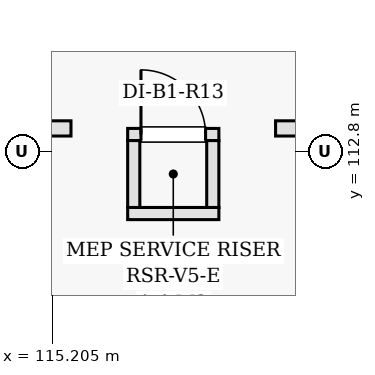
"""IFC4 building model, lengths in metres.
Left out: names, types, materials, properties, quantities, classifications, styles, units other than length and angle.
Written with IfcOpenShell. Run it as: python <this file> out.ifc"""

import sys

from ifc_helpers import new_model, si_unit, direction, frame, frame_2d, origin, place, context, subcontext, project, spatial, rectangle, extrude, element, fill, save


model = new_model("IFC4")
c1 = context("Model", 3, precision=1e-05, world=origin(), true_north=direction((0.0, 1.0)))
c2 = subcontext(c1, "Body", "Model", "MODEL_VIEW")
j1 = project(units=[si_unit("LENGTHUNIT", "METRE"), si_unit("PLANEANGLEUNIT", "RADIAN")], contexts=[c1])
p1 = place(None, origin())
s1 = spatial("IfcSite", under=j1, at=p1, CompositionType="ELEMENT")
p2 = place(p1, origin())
s2 = spatial("IfcBuilding", under=s1, at=p2, CompositionType="ELEMENT")
p3 = place(p2, frame((0.0, 0.0, -4.5)))
s3 = spatial("IfcBuildingStorey", under=s2, at=p3, CompositionType="ELEMENT", Elevation=-4.5)
p4 = place(p3, frame((116.2, 111.98, 0.0), z_axis=(0.0, 0.0, 1.0), x_axis=(1.0, 0.0, 0.0)))
e1 = element("IfcWall", 1, at=p4, inside=s3, PredefinedType="PARTITIONING", context=c2, shape_type="SweptSolid", body=[
    extrude(rectangle(XDim=1.2, YDim=0.16, at=frame_2d((0.6, 0.0))), origin(), (0.0, 0.0, 1.0), 4.15),
])
p5 = place(p3, frame((116.2, 113.02, 0.0), z_axis=(0.0, 0.0, 1.0), x_axis=(1.0, 0.0, 0.0)))
e2 = element("IfcWall", 2, at=p5, inside=s3, PredefinedType="PARTITIONING", context=c2, shape_type="SweptSolid", body=[
    extrude(rectangle(XDim=1.2, YDim=0.16, at=frame_2d((0.6, 0.0))), origin(), (0.0, 0.0, 1.0), 4.15),
])
p6 = place(p5, frame((0.175, 0.0, 0.0)))
e3 = element("IfcOpeningElement", 3, at=p6, cuts=e2, PredefinedType="OPENING", context=c2, shape_type="SweptSolid", body=[
    extrude(rectangle(XDim=0.85, YDim=2.02, at=frame_2d((0.425, 1.01))), frame((0.0, 0.09, 0.0), z_axis=(0.0, -1.0, 0.0), x_axis=(1.0, 0.0, 0.0)), (0.0, 0.0, 1.0), 0.18),
])
for number, where, z_axis, x_axis in (
    (4, (116.28, 112.06, 0.0), (0.0, 0.0, 1.0), (0.0, 1.0, 0.0)),
    (5, (117.32, 112.06, 0.0), (0.0, 0.0, 1.0), (0.0, 1.0, 0.0)),
):
    element("IfcWall", number, at=place(p3, frame(where, z_axis=z_axis, x_axis=x_axis)), inside=s3, PredefinedType="PARTITIONING", context=c2, shape_type="SweptSolid", body=[
        extrude(rectangle(XDim=0.88, YDim=0.16, at=frame_2d((0.44, 0.0))), origin(), (0.0, 0.0, 1.0), 4.15),
    ])
p7 = place(p3, frame((112.42, 113.1, 0.0), z_axis=(0.0, 0.0, 1.0), x_axis=(1.0, 0.0, 0.0)))
e6 = element("IfcWall", 6, at=p7, inside=s3, PredefinedType="PARTITIONING", context=c2, shape_type="SweptSolid", body=[
    extrude(rectangle(XDim=3.034, YDim=0.2, at=frame_2d((1.517, 0.0))), origin(), (0.0, 0.0, 1.0), 4.15),
])
p8 = place(p3, frame((118.146, 113.1, 0.0), z_axis=(0.0, 0.0, 1.0), x_axis=(1.0, 0.0, 0.0)))
e7 = element("IfcWall", 7, at=p8, inside=s3, PredefinedType="PARTITIONING", context=c2, shape_type="SweptSolid", body=[
    extrude(rectangle(XDim=3.354, YDim=0.2, at=frame_2d((1.677, 0.0))), origin(), (0.0, 0.0, 1.0), 3.385),
])
p9 = place(p6, origin())
e8 = element("IfcDoor", 8, at=p9, inside=s3, OperationType="SINGLE_SWING_LEFT", PredefinedType="DOOR", context=c2, shape_type="SweptSolid", body=[
    extrude(rectangle(XDim=0.85, YDim=2.02, at=frame_2d((0.425, 1.01))), frame((0.0, 0.025, 0.0), z_axis=(0.0, -1.0, 0.0), x_axis=(1.0, 0.0, 0.0)), (0.0, 0.0, 1.0), 0.05),
])
fill(e3, e8)
save(model, sys.argv[1])
